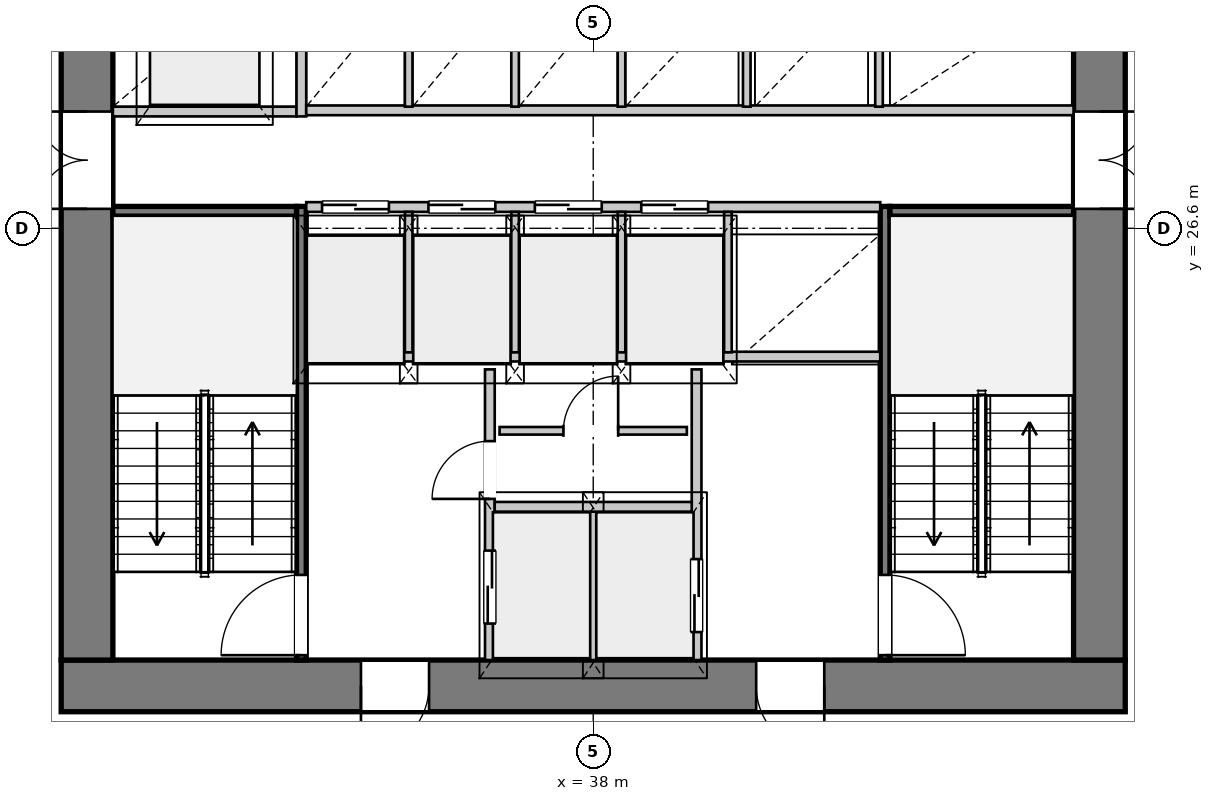
"""IFC4 building model, lengths in metres.
Left out: names, types, materials, properties, quantities, classifications, styles, units other than length and angle.
Written with IfcOpenShell. Run it as: python <this file> out.ifc"""

import sys

from ifc_helpers import new_model, si_unit, direction, frame, frame_2d, origin, place, context, subcontext, project, spatial, rectangle, extrude, source, transform, mapped, element, fill, save


model = new_model("IFC4")
c1 = context("Model", 3, precision=1e-05, world=origin(), true_north=direction((0.0, 1.0)))
c2 = subcontext(c1, "Body", "Model", "MODEL_VIEW")
j1 = project(units=[si_unit("LENGTHUNIT", "METRE"), si_unit("PLANEANGLEUNIT", "RADIAN")], contexts=[c1])
p1 = place(None, origin())
s1 = spatial("IfcSite", under=j1, at=p1, CompositionType="ELEMENT")
p2 = place(p1, origin())
s2 = spatial("IfcBuilding", under=s1, at=p2, CompositionType="ELEMENT")
p3 = place(p2, frame((0.0, 0.0, 43.5)))
s3 = spatial("IfcBuildingStorey", under=s2, at=p3, CompositionType="ELEMENT", Elevation=43.5)
p4 = place(p3, frame((46.75, 19.075, 0.0), z_axis=(0.0, 0.0, 1.0), x_axis=(-1.0, 0.0, 0.0)))
e1 = element("IfcWall", 1, at=p4, inside=s3, PredefinedType="SHEAR", context=c2, shape_type="SweptSolid", body=[
    extrude(rectangle(XDim=17.5, YDim=0.85, at=frame_2d((8.75, 0.0))), origin(), (0.0, 0.0, 1.0), 3.3),
])
p5 = place(p4, frame((4.95, 0.0, 0.0)))
e2 = element("IfcOpeningElement", 2, at=p5, cuts=e1, PredefinedType="OPENING", context=c2, shape_type="SweptSolid", body=[
    extrude(rectangle(XDim=1.12, YDim=2.25, at=frame_2d((0.56, 1.125))), frame((0.0, 0.435, 0.0), z_axis=(0.0, -1.0, 0.0), x_axis=(1.0, 0.0, 0.0)), (0.0, 0.0, 1.0), 0.87),
])
p6 = place(p4, frame((11.45, 0.0, 0.0)))
e3 = element("IfcOpeningElement", 3, at=p6, cuts=e1, PredefinedType="OPENING", context=c2, shape_type="SweptSolid", body=[
    extrude(rectangle(XDim=1.12, YDim=2.25, at=frame_2d((0.56, 1.125))), frame((0.0, 0.435, 0.0), z_axis=(0.0, -1.0, 0.0), x_axis=(1.0, 0.0, 0.0)), (0.0, 0.0, 1.0), 0.87),
])
p7 = place(p3, frame((29.675, 19.5, 0.0), z_axis=(0.0, 0.0, 1.0), x_axis=(0.0, 1.0, 0.0)))
e4 = element("IfcWall", 4, at=p7, inside=s3, PredefinedType="SHEAR", context=c2, shape_type="SweptSolid", body=[
    extrude(rectangle(XDim=14.2, YDim=0.85, at=frame_2d((7.1, 0.0))), origin(), (0.0, 0.0, 1.0), 3.3),
])
p8 = place(p7, frame((7.42, 0.0, 0.0)))
e5 = element("IfcOpeningElement", 5, at=p8, cuts=e4, PredefinedType="OPENING", context=c2, shape_type="SweptSolid", body=[
    extrude(rectangle(XDim=1.6, YDim=2.2, at=frame_2d((0.8, 1.1))), frame((0.0, 0.435, 0.0), z_axis=(0.0, -1.0, 0.0), x_axis=(1.0, 0.0, 0.0)), (0.0, 0.0, 1.0), 0.87),
])
p9 = place(p3, frame((46.325, 33.7, 0.0), z_axis=(0.0, 0.0, 1.0), x_axis=(0.0, -1.0, 0.0)))
e6 = element("IfcWall", 6, at=p9, inside=s3, PredefinedType="SHEAR", context=c2, shape_type="SweptSolid", body=[
    extrude(rectangle(XDim=14.2, YDim=0.85, at=frame_2d((7.1, 0.0))), origin(), (0.0, 0.0, 1.0), 3.3),
])
p10 = place(p9, frame((5.18, 0.0, 0.0)))
e7 = element("IfcOpeningElement", 7, at=p10, cuts=e6, PredefinedType="OPENING", context=c2, shape_type="SweptSolid", body=[
    extrude(rectangle(XDim=1.6, YDim=2.2, at=frame_2d((0.8, 1.1))), frame((0.0, 0.435, 0.0), z_axis=(0.0, -1.0, 0.0), x_axis=(1.0, 0.0, 0.0)), (0.0, 0.0, 1.0), 0.87),
])
p11 = place(p3, frame((33.2, 19.5, 0.0), z_axis=(0.0, 0.0, 1.0), x_axis=(0.0, 1.0, 0.0)))
e8 = element("IfcWall", 8, at=p11, inside=s3, PredefinedType="PARTITIONING", context=c2, shape_type="SweptSolid", body=[
    extrude(rectangle(XDim=7.46, YDim=0.16, at=frame_2d((3.73, 0.0))), origin(), (0.0, 0.0, 1.0), 3.3),
])
p12 = place(p11, frame((0.08, 0.0, 0.0)))
e9 = element("IfcOpeningElement", 9, at=p12, cuts=e8, PredefinedType="OPENING", context=c2, shape_type="SweptSolid", body=[
    extrude(rectangle(XDim=1.32, YDim=2.2, at=frame_2d((0.66, 1.1))), frame((0.0, 0.09, 0.0), z_axis=(0.0, -1.0, 0.0), x_axis=(1.0, 0.0, 0.0)), (0.0, 0.0, 1.0), 0.18),
])
p13 = place(p3, frame((30.1, 26.88, 0.0), z_axis=(0.0, 0.0, 1.0), x_axis=(1.0, 0.0, 0.0)))
e10 = element("IfcWall", 10, at=p13, inside=s3, PredefinedType="PARTITIONING", context=c2, shape_type="SweptSolid", body=[
    extrude(rectangle(XDim=3.02, YDim=0.16, at=frame_2d((1.51, 0.0))), origin(), (0.0, 0.0, 1.0), 3.3),
])
p14 = place(p3, frame((42.8, 26.96, 0.0), z_axis=(0.0, 0.0, 1.0), x_axis=(0.0, -1.0, 0.0)))
e11 = element("IfcWall", 11, at=p14, inside=s3, PredefinedType="PARTITIONING", context=c2, shape_type="SweptSolid", body=[
    extrude(rectangle(XDim=7.46, YDim=0.16, at=frame_2d((3.73, 0.0))), origin(), (0.0, 0.0, 1.0), 3.3),
])
p15 = place(p14, frame((6.06, 0.0, 0.0)))
e12 = element("IfcOpeningElement", 12, at=p15, cuts=e11, PredefinedType="OPENING", context=c2, shape_type="SweptSolid", body=[
    extrude(rectangle(XDim=1.32, YDim=2.2, at=frame_2d((0.66, 1.1))), frame((0.0, 0.09, 0.0), z_axis=(0.0, -1.0, 0.0), x_axis=(1.0, 0.0, 0.0)), (0.0, 0.0, 1.0), 0.18),
])
p16 = place(p3, frame((42.88, 26.88, 0.0), z_axis=(0.0, 0.0, 1.0), x_axis=(1.0, 0.0, 0.0)))
e13 = element("IfcWall", 13, at=p16, inside=s3, PredefinedType="PARTITIONING", context=c2, shape_type="SweptSolid", body=[
    extrude(rectangle(XDim=3.02, YDim=0.16, at=frame_2d((1.51, 0.0))), origin(), (0.0, 0.0, 1.0), 3.3),
])
p17 = place(p3, frame((36.3, 19.5, 0.0), z_axis=(0.0, 0.0, 1.0), x_axis=(0.0, 1.0, 0.0)))
e14 = element("IfcWall", 14, at=p17, inside=s3, PredefinedType="PARTITIONING", context=c2, shape_type="SweptSolid", body=[
    extrude(rectangle(XDim=4.78, YDim=0.16, at=frame_2d((2.39, 0.0))), origin(), (0.0, 0.0, 1.0), 3.3),
])
p18 = place(p17, frame((0.6, 0.0, 0.0)))
e15 = element("IfcOpeningElement", 15, at=p18, cuts=e14, PredefinedType="OPENING", context=c2, shape_type="SweptSolid", body=[
    extrude(rectangle(XDim=1.2, YDim=2.2, at=frame_2d((0.6, 1.1))), frame((0.0, 0.09, 0.0), z_axis=(0.0, -1.0, 0.0), x_axis=(1.0, 0.0, 0.0)), (0.0, 0.0, 1.0), 0.18),
])
p19 = place(p17, frame((2.65, 0.0, 0.0)))
e16 = element("IfcOpeningElement", 16, at=p19, cuts=e14, PredefinedType="OPENING", context=c2, shape_type="SweptSolid", body=[
    extrude(rectangle(XDim=0.95, YDim=2.1, at=frame_2d((0.475, 1.05))), frame((0.0, 0.09, 0.0), z_axis=(0.0, -1.0, 0.0), x_axis=(1.0, 0.0, 0.0)), (0.0, 0.0, 1.0), 0.18),
])
p20 = place(p3, frame((39.7, 24.28, 0.0), z_axis=(0.0, 0.0, 1.0), x_axis=(0.0, -1.0, 0.0)))
e17 = element("IfcWall", 17, at=p20, inside=s3, PredefinedType="PARTITIONING", context=c2, shape_type="SweptSolid", body=[
    extrude(rectangle(XDim=4.78, YDim=0.16, at=frame_2d((2.39, 0.0))), origin(), (0.0, 0.0, 1.0), 3.3),
])
p21 = place(p20, frame((3.12, 0.0, 0.0)))
e18 = element("IfcOpeningElement", 18, at=p21, cuts=e17, PredefinedType="OPENING", context=c2, shape_type="SweptSolid", body=[
    extrude(rectangle(XDim=1.2, YDim=2.2, at=frame_2d((0.6, 1.1))), frame((0.0, 0.09, 0.0), z_axis=(0.0, -1.0, 0.0), x_axis=(1.0, 0.0, 0.0)), (0.0, 0.0, 1.0), 0.18),
])
p22 = place(p3, frame((38.0, 19.5, 0.0), z_axis=(0.0, 0.0, 1.0), x_axis=(0.0, 1.0, 0.0)))
e19 = element("IfcWall", 19, at=p22, inside=s3, PredefinedType="PARTITIONING", context=c2, shape_type="SweptSolid", body=[
    extrude(rectangle(XDim=2.46, YDim=0.125, at=frame_2d((1.23, 0.0))), origin(), (0.0, 0.0, 1.0), 3.3),
])
p23 = place(p3, frame((36.38, 22.02, 0.0), z_axis=(0.0, 0.0, 1.0), x_axis=(1.0, 0.0, 0.0)))
e20 = element("IfcWall", 20, at=p23, inside=s3, PredefinedType="PARTITIONING", context=c2, shape_type="SweptSolid", body=[
    extrude(rectangle(XDim=3.24, YDim=0.16, at=frame_2d((1.62, 0.0))), origin(), (0.0, 0.0, 1.0), 3.3),
])
p24 = place(p3, frame((33.28, 24.49, 0.0), z_axis=(0.0, 0.0, 1.0), x_axis=(1.0, 0.0, 0.0)))
e21 = element("IfcWall", 21, at=p24, inside=s3, PredefinedType="PARTITIONING", context=c2, shape_type="SweptSolid", body=[
    extrude(rectangle(XDim=9.44, YDim=0.16, at=frame_2d((4.72, 0.0))), origin(), (0.0, 0.0, 1.0), 3.3),
])
p25 = place(p3, frame((36.46, 23.27, 0.0), z_axis=(0.0, 0.0, 1.0), x_axis=(1.0, 0.0, 0.0)))
e22 = element("IfcWall", 22, at=p25, inside=s3, PredefinedType="PARTITIONING", context=c2, shape_type="SweptSolid", body=[
    extrude(rectangle(XDim=3.08, YDim=0.125, at=frame_2d((1.54, 0.0))), origin(), (0.0, 0.0, 1.0), 3.3),
])
p26 = place(p25, frame((1.05, 0.0, 0.0)))
e23 = element("IfcOpeningElement", 23, at=p26, cuts=e22, PredefinedType="OPENING", context=c2, shape_type="SweptSolid", body=[
    extrude(rectangle(XDim=0.9, YDim=2.1, at=frame_2d((0.45, 1.05))), frame((0.0, 0.073, 0.0), z_axis=(0.0, -1.0, 0.0), x_axis=(1.0, 0.0, 0.0)), (0.0, 0.0, 1.0), 0.145),
])
p27 = place(p3, frame((30.1, 28.52, 0.0), z_axis=(0.0, 0.0, 1.0), x_axis=(1.0, 0.0, 0.0)))
e24 = element("IfcWall", 24, at=p27, inside=s3, PredefinedType="PARTITIONING", context=c2, shape_type="SweptSolid", body=[
    extrude(rectangle(XDim=3.02, YDim=0.16, at=frame_2d((1.51, 0.0))), origin(), (0.0, 0.0, 1.0), 3.3),
])
p28 = place(p3, frame((33.2, 28.44, 0.0), z_axis=(0.0, 0.0, 1.0), x_axis=(0.0, 1.0, 0.0)))
e25 = element("IfcWall", 25, at=p28, inside=s3, PredefinedType="PARTITIONING", context=c2, shape_type="SweptSolid", body=[
    extrude(rectangle(XDim=5.26, YDim=0.16, at=frame_2d((2.63, 0.0))), origin(), (0.0, 0.0, 1.0), 3.3),
])
p29 = place(p3, frame((33.28, 26.95, 0.0), z_axis=(0.0, 0.0, 1.0), x_axis=(1.0, 0.0, 0.0)))
e26 = element("IfcWall", 26, at=p29, inside=s3, PredefinedType="PARTITIONING", context=c2, shape_type="SweptSolid", body=[
    extrude(rectangle(XDim=9.44, YDim=0.16, at=frame_2d((4.72, 0.0))), origin(), (0.0, 0.0, 1.0), 3.3),
])
p30 = place(p29, frame((0.26, 0.0, 0.0)))
e27 = element("IfcOpeningElement", 27, at=p30, cuts=e26, PredefinedType="OPENING", context=c2, shape_type="SweptSolid", body=[
    extrude(rectangle(XDim=1.1, YDim=2.2, at=frame_2d((0.55, 1.1))), frame((0.0, 0.09, 0.0), z_axis=(0.0, -1.0, 0.0), x_axis=(1.0, 0.0, 0.0)), (0.0, 0.0, 1.0), 0.18),
])
p31 = place(p29, frame((2.01, 0.0, 0.0)))
e28 = element("IfcOpeningElement", 28, at=p31, cuts=e26, PredefinedType="OPENING", context=c2, shape_type="SweptSolid", body=[
    extrude(rectangle(XDim=1.1, YDim=2.2, at=frame_2d((0.55, 1.1))), frame((0.0, 0.09, 0.0), z_axis=(0.0, -1.0, 0.0), x_axis=(1.0, 0.0, 0.0)), (0.0, 0.0, 1.0), 0.18),
])
p32 = place(p29, frame((3.76, 0.0, 0.0)))
e29 = element("IfcOpeningElement", 29, at=p32, cuts=e26, PredefinedType="OPENING", context=c2, shape_type="SweptSolid", body=[
    extrude(rectangle(XDim=1.1, YDim=2.2, at=frame_2d((0.55, 1.1))), frame((0.0, 0.09, 0.0), z_axis=(0.0, -1.0, 0.0), x_axis=(1.0, 0.0, 0.0)), (0.0, 0.0, 1.0), 0.18),
])
p33 = place(p29, frame((5.51, 0.0, 0.0)))
e30 = element("IfcOpeningElement", 30, at=p33, cuts=e26, PredefinedType="OPENING", context=c2, shape_type="SweptSolid", body=[
    extrude(rectangle(XDim=1.1, YDim=2.2, at=frame_2d((0.55, 1.1))), frame((0.0, 0.09, 0.0), z_axis=(0.0, -1.0, 0.0), x_axis=(1.0, 0.0, 0.0)), (0.0, 0.0, 1.0), 0.18),
])
for number, where, z_axis, x_axis in (
    (31, (34.965, 24.56, 0.0), (0.0, 0.0, 1.0), (0.0, 1.0, 0.0)),
    (32, (36.715, 24.56, 0.0), (0.0, 0.0, 1.0), (0.0, 1.0, 0.0)),
    (33, (38.465, 24.56, 0.0), (0.0, 0.0, 1.0), (0.0, 1.0, 0.0)),
    (34, (40.215, 24.56, 0.0), (0.0, 0.0, 1.0), (0.0, 1.0, 0.0)),
):
    element("IfcWall", number, at=place(p3, frame(where, z_axis=z_axis, x_axis=x_axis)), inside=s3, PredefinedType="PARTITIONING", context=c2, shape_type="SweptSolid", body=[
        extrude(rectangle(XDim=2.31, YDim=0.125, at=frame_2d((1.155, 0.0))), origin(), (0.0, 0.0, 1.0), 3.3),
    ])
p34 = place(p3, frame((33.28, 28.54, 0.0), z_axis=(0.0, 0.0, 1.0), x_axis=(1.0, 0.0, 0.0)))
e35 = element("IfcWall", 35, at=p34, inside=s3, PredefinedType="PARTITIONING", context=c2, shape_type="SweptSolid", body=[
    extrude(rectangle(XDim=12.62, YDim=0.16, at=frame_2d((6.31, 0.0))), origin(), (0.0, 0.0, 1.0), 3.3),
])
for number, where, z_axis, x_axis in (
    (36, (34.965, 28.6, 0.0), (0.0, 0.0, 1.0), (0.0, 1.0, 0.0)),
    (37, (36.715, 28.6, 0.0), (0.0, 0.0, 1.0), (0.0, 1.0, 0.0)),
    (38, (38.465, 28.6, 0.0), (0.0, 0.0, 1.0), (0.0, 1.0, 0.0)),
    (39, (40.525, 28.6, 0.0), (0.0, 0.0, 1.0), (0.0, 1.0, 0.0)),
    (40, (42.7, 28.6, 0.0), (0.0, 0.0, 1.0), (0.0, 1.0, 0.0)),
):
    element("IfcWall", number, at=place(p3, frame(where, z_axis=z_axis, x_axis=x_axis)), inside=s3, PredefinedType="PARTITIONING", context=c2, shape_type="SweptSolid", body=[
        extrude(rectangle(XDim=1.92, YDim=0.125, at=frame_2d((0.96, 0.0))), origin(), (0.0, 0.0, 1.0), 3.3),
    ])
m1 = source(origin(), c2, "Body", "SweptSolid", [
    extrude(rectangle(XDim=1.12, YDim=2.25, at=frame_2d((0.56, 1.125))), frame((0.0, 0.025, 0.0), z_axis=(0.0, -1.0, 0.0), x_axis=(1.0, 0.0, 0.0)), (0.0, 0.0, 1.0), 0.05),
])
p35 = place(p5, origin())
e41 = element("IfcDoor", 41, at=p35, inside=s3, OperationType="SINGLE_SWING_LEFT", PredefinedType="DOOR", context=c2, shape_type="MappedRepresentation", body=[
    mapped(m1, transform((0.0, 0.0, 0.0), x_axis=(1.0, 0.0, 0.0), y_axis=(0.0, 1.0, 0.0), z_axis=(0.0, 0.0, 1.0), scale=1.0)),
])
fill(e2, e41)
p36 = place(p6, origin())
e42 = element("IfcDoor", 42, at=p36, inside=s3, OperationType="SINGLE_SWING_RIGHT", PredefinedType="DOOR", context=c2, shape_type="MappedRepresentation", body=[
    mapped(m1, transform((0.0, 0.0, 0.0), x_axis=(1.0, 0.0, 0.0), y_axis=(0.0, 1.0, 0.0), z_axis=(0.0, 0.0, 1.0), scale=1.0)),
])
fill(e3, e42)
m2 = source(origin(), c2, "Body", "SweptSolid", [
    extrude(rectangle(XDim=1.6, YDim=2.2, at=frame_2d((0.8, 1.1))), frame((0.0, 0.025, 0.0), z_axis=(0.0, -1.0, 0.0), x_axis=(1.0, 0.0, 0.0)), (0.0, 0.0, 1.0), 0.05),
])
p37 = place(p8, origin())
e43 = element("IfcDoor", 43, at=p37, inside=s3, OperationType="DOUBLE_DOOR_SINGLE_SWING", PredefinedType="DOOR", context=c2, shape_type="MappedRepresentation", body=[
    mapped(m2, transform((0.0, 0.0, 0.0), x_axis=(1.0, 0.0, 0.0), y_axis=(0.0, 1.0, 0.0), z_axis=(0.0, 0.0, 1.0), scale=1.0)),
])
fill(e5, e43)
p38 = place(p10, origin())
e44 = element("IfcDoor", 44, at=p38, inside=s3, OperationType="DOUBLE_DOOR_SINGLE_SWING", PredefinedType="DOOR", context=c2, shape_type="MappedRepresentation", body=[
    mapped(m2, transform((0.0, 0.0, 0.0), x_axis=(1.0, 0.0, 0.0), y_axis=(0.0, 1.0, 0.0), z_axis=(0.0, 0.0, 1.0), scale=1.0)),
])
fill(e7, e44)
m3 = source(origin(), c2, "Body", "SweptSolid", [
    extrude(rectangle(XDim=1.32, YDim=2.2, at=frame_2d((0.66, 1.1))), frame((0.0, 0.025, 0.0), z_axis=(0.0, -1.0, 0.0), x_axis=(1.0, 0.0, 0.0)), (0.0, 0.0, 1.0), 0.05),
])
p39 = place(p12, origin())
e45 = element("IfcDoor", 45, at=p39, inside=s3, OperationType="SINGLE_SWING_LEFT", PredefinedType="DOOR", context=c2, shape_type="MappedRepresentation", body=[
    mapped(m3, transform((0.0, 0.0, 0.0), x_axis=(1.0, 0.0, 0.0), y_axis=(0.0, 1.0, 0.0), z_axis=(0.0, 0.0, 1.0), scale=1.0)),
])
fill(e9, e45)
p40 = place(p15, origin())
e46 = element("IfcDoor", 46, at=p40, inside=s3, OperationType="SINGLE_SWING_RIGHT", PredefinedType="DOOR", context=c2, shape_type="MappedRepresentation", body=[
    mapped(m3, transform((0.0, 0.0, 0.0), x_axis=(1.0, 0.0, 0.0), y_axis=(0.0, 1.0, 0.0), z_axis=(0.0, 0.0, 1.0), scale=1.0)),
])
fill(e12, e46)
m4 = source(origin(), c2, "Body", "SweptSolid", [
    extrude(rectangle(XDim=1.2, YDim=2.2, at=frame_2d((0.6, 1.1))), frame((0.0, 0.025, 0.0), z_axis=(0.0, -1.0, 0.0), x_axis=(1.0, 0.0, 0.0)), (0.0, 0.0, 1.0), 0.05),
])
p41 = place(p18, origin())
e47 = element("IfcDoor", 47, at=p41, inside=s3, OperationType="DOUBLE_DOOR_SLIDING", PredefinedType="DOOR", context=c2, shape_type="MappedRepresentation", body=[
    mapped(m4, transform((0.0, 0.0, 0.0), x_axis=(1.0, 0.0, 0.0), y_axis=(0.0, 1.0, 0.0), z_axis=(0.0, 0.0, 1.0), scale=1.0)),
])
fill(e15, e47)
m5 = source(origin(), c2, "Body", "SweptSolid", [
    extrude(rectangle(XDim=0.95, YDim=2.1, at=frame_2d((0.475, 1.05))), frame((0.0, 0.025, 0.0), z_axis=(0.0, -1.0, 0.0), x_axis=(1.0, 0.0, 0.0)), (0.0, 0.0, 1.0), 0.05),
])
p42 = place(p19, origin())
e48 = element("IfcDoor", 48, at=p42, inside=s3, OperationType="SINGLE_SWING_LEFT", PredefinedType="DOOR", context=c2, shape_type="MappedRepresentation", body=[
    mapped(m5, transform((0.0, 0.0, 0.0), x_axis=(1.0, 0.0, 0.0), y_axis=(0.0, 1.0, 0.0), z_axis=(0.0, 0.0, 1.0), scale=1.0)),
])
fill(e16, e48)
m6 = source(origin(), c2, "Body", "SweptSolid", [
    extrude(rectangle(XDim=0.9, YDim=2.1, at=frame_2d((0.45, 1.05))), frame((0.0, 0.025, 0.0), z_axis=(0.0, -1.0, 0.0), x_axis=(1.0, 0.0, 0.0)), (0.0, 0.0, 1.0), 0.05),
])
p43 = place(p26, origin())
e49 = element("IfcDoor", 49, at=p43, inside=s3, OperationType="SINGLE_SWING_RIGHT", PredefinedType="DOOR", context=c2, shape_type="MappedRepresentation", body=[
    mapped(m6, transform((0.0, 0.0, 0.0), x_axis=(1.0, 0.0, 0.0), y_axis=(0.0, 1.0, 0.0), z_axis=(0.0, 0.0, 1.0), scale=1.0)),
])
fill(e23, e49)
p44 = place(p21, origin())
e50 = element("IfcDoor", 50, at=p44, inside=s3, OperationType="DOUBLE_DOOR_SLIDING", PredefinedType="DOOR", context=c2, shape_type="MappedRepresentation", body=[
    mapped(m4, transform((0.0, 0.0, 0.0), x_axis=(1.0, 0.0, 0.0), y_axis=(0.0, 1.0, 0.0), z_axis=(0.0, 0.0, 1.0), scale=1.0)),
])
fill(e18, e50)
m7 = source(origin(), c2, "Body", "SweptSolid", [
    extrude(rectangle(XDim=1.1, YDim=2.2, at=frame_2d((0.55, 1.1))), frame((0.0, 0.025, 0.0), z_axis=(0.0, -1.0, 0.0), x_axis=(1.0, 0.0, 0.0)), (0.0, 0.0, 1.0), 0.05),
])
p45 = place(p30, origin())
e51 = element("IfcDoor", 51, at=p45, inside=s3, OperationType="DOUBLE_DOOR_SLIDING", PredefinedType="DOOR", context=c2, shape_type="MappedRepresentation", body=[
    mapped(m7, transform((0.0, 0.0, 0.0), x_axis=(1.0, 0.0, 0.0), y_axis=(0.0, 1.0, 0.0), z_axis=(0.0, 0.0, 1.0), scale=1.0)),
])
fill(e27, e51)
p46 = place(p31, origin())
e52 = element("IfcDoor", 52, at=p46, inside=s3, OperationType="DOUBLE_DOOR_SLIDING", PredefinedType="DOOR", context=c2, shape_type="MappedRepresentation", body=[
    mapped(m7, transform((0.0, 0.0, 0.0), x_axis=(1.0, 0.0, 0.0), y_axis=(0.0, 1.0, 0.0), z_axis=(0.0, 0.0, 1.0), scale=1.0)),
])
fill(e28, e52)
p47 = place(p32, origin())
e53 = element("IfcDoor", 53, at=p47, inside=s3, OperationType="DOUBLE_DOOR_SLIDING", PredefinedType="DOOR", context=c2, shape_type="MappedRepresentation", body=[
    mapped(m7, transform((0.0, 0.0, 0.0), x_axis=(1.0, 0.0, 0.0), y_axis=(0.0, 1.0, 0.0), z_axis=(0.0, 0.0, 1.0), scale=1.0)),
])
fill(e29, e53)
p48 = place(p33, origin())
e54 = element("IfcDoor", 54, at=p48, inside=s3, OperationType="DOUBLE_DOOR_SLIDING", PredefinedType="DOOR", context=c2, shape_type="MappedRepresentation", body=[
    mapped(m7, transform((0.0, 0.0, 0.0), x_axis=(1.0, 0.0, 0.0), y_axis=(0.0, 1.0, 0.0), z_axis=(0.0, 0.0, 1.0), scale=1.0)),
])
fill(e30, e54)
save(model, sys.argv[1])
